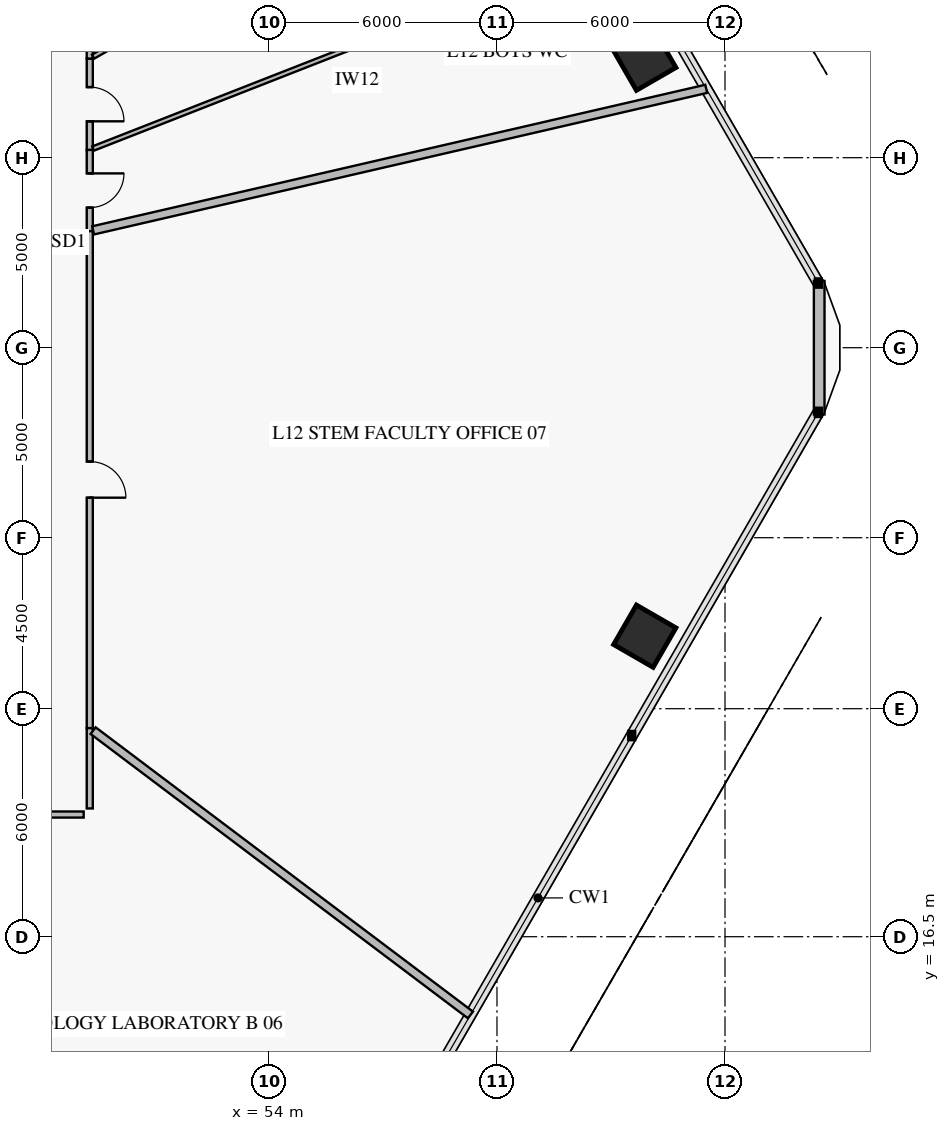
"""IFC4 building model, lengths in metres.
Left out: names, types, materials, properties, quantities, classifications, styles, units other than length and angle.
Written with IfcOpenShell. Run it as: python <this file> out.ifc"""

import sys

from ifc_helpers import new_model, si_unit, direction, frame, frame_2d, origin, origin_2d, place, context, subcontext, project, spatial, rectangle, extrude, element, fill, save


model = new_model("IFC4")
c1 = context("Model", 3, precision=1e-05, world=origin(), true_north=direction((0.0, 1.0)))
c2 = subcontext(c1, "Body", "Model", "MODEL_VIEW")
j1 = project(units=[si_unit("LENGTHUNIT", "METRE"), si_unit("PLANEANGLEUNIT", "RADIAN")], contexts=[c1])
p1 = place(None, origin())
s1 = spatial("IfcSite", under=j1, at=p1, CompositionType="ELEMENT")
p2 = place(p1, origin())
s2 = spatial("IfcBuilding", under=s1, at=p2, CompositionType="ELEMENT")
p3 = place(p2, frame((0.0, 0.0, 49.8)))
s3 = spatial("IfcBuildingStorey", under=s2, at=p3, CompositionType="ELEMENT", Elevation=49.8)
for number, where, z_axis, x_axis in (
    (1, (63.889, 39.592, 0.0), (0.0, 0.0, 1.0), (-0.5, 0.866, 0.0)),
    (2, (63.889, 24.408, 0.0), (0.0, 0.0, 1.0), (0.5, 0.866, 0.0)),
):
    element("IfcColumn", number, at=place(p3, frame(where, z_axis=z_axis, x_axis=x_axis)), inside=s3, PredefinedType="COLUMN", context=c2, shape_type="SweptSolid", body=[
        extrude(rectangle(XDim=1.2, YDim=1.2, at=origin_2d()), origin(), (0.0, 0.0, 1.0), 3.92),
    ])
p4 = place(p3, frame((68.479, 33.758, 0.0), z_axis=(0.0, 0.0, 1.0), x_axis=(0.0, -1.0, 0.0)))
e3 = element("IfcWall", 3, at=p4, inside=s3, PredefinedType="SOLIDWALL", context=c2, shape_type="SweptSolid", body=[
    extrude(rectangle(XDim=3.515, YDim=0.28, at=frame_2d((1.758, 0.0))), origin(), (0.0, 0.0, 1.0), 3.92),
])
p5 = place(p3, frame((49.285, 35.067, 0.0), z_axis=(0.0, 0.0, 1.0), x_axis=(0.0, 1.0, 0.0)))
e4 = element("IfcWall", 4, at=p5, inside=s3, PredefinedType="PARTITIONING", context=c2, shape_type="SweptSolid", body=[
    extrude(rectangle(XDim=2.139, YDim=0.16, at=frame_2d((1.07, 0.0))), origin(), (0.0, 0.0, 1.0), 3.22),
])
p6 = place(p5, frame((0.62, 0.0, 0.0)))
e5 = element("IfcOpeningElement", 5, at=p6, cuts=e4, PredefinedType="OPENING", context=c2, shape_type="SweptSolid", body=[
    extrude(rectangle(XDim=0.9, YDim=2.1, at=frame_2d((0.45, 1.05))), frame((0.0, 0.092, 0.0), z_axis=(0.0, -1.0, 0.0), x_axis=(1.0, 0.0, 0.0)), (0.0, 0.0, 1.0), 0.184),
])
p7 = place(p3, frame((49.285, 37.206, 0.0), z_axis=(0.0, 0.0, 1.0), x_axis=(0.0, 1.0, 0.0)))
e6 = element("IfcWall", 6, at=p7, inside=s3, PredefinedType="PARTITIONING", context=c2, shape_type="SweptSolid", body=[
    extrude(rectangle(XDim=2.402, YDim=0.16, at=frame_2d((1.201, 0.0))), origin(), (0.0, 0.0, 1.0), 3.92),
])
p8 = place(p7, frame((0.751, 0.0, 0.0)))
e7 = element("IfcOpeningElement", 7, at=p8, cuts=e6, PredefinedType="OPENING", context=c2, shape_type="SweptSolid", body=[
    extrude(rectangle(XDim=0.9, YDim=2.1, at=frame_2d((0.45, 1.05))), frame((0.0, 0.092, 0.0), z_axis=(0.0, -1.0, 0.0), x_axis=(1.0, 0.0, 0.0)), (0.0, 0.0, 1.0), 0.184),
])
p9 = place(p3, frame((49.285, 39.608, 0.0), z_axis=(0.0, 0.0, 1.0), x_axis=(0.0, 1.0, 0.0)))
e8 = element("IfcWall", 8, at=p9, inside=s3, PredefinedType="PARTITIONING", context=c2, shape_type="SweptSolid", body=[
    extrude(rectangle(XDim=2.403, YDim=0.16, at=frame_2d((1.201, 0.0))), origin(), (0.0, 0.0, 1.0), 3.92),
])
p10 = place(p9, frame((0.751, 0.0, 0.0)))
e9 = element("IfcOpeningElement", 9, at=p10, cuts=e8, PredefinedType="OPENING", context=c2, shape_type="SweptSolid", body=[
    extrude(rectangle(XDim=0.9, YDim=2.1, at=frame_2d((0.45, 1.05))), frame((0.0, 0.092, 0.0), z_axis=(0.0, -1.0, 0.0), x_axis=(1.0, 0.0, 0.0)), (0.0, 0.0, 1.0), 0.184),
])
p11 = place(p3, frame((41.729, 19.715, 0.0), z_axis=(0.0, 0.0, 1.0), x_axis=(1.0, 0.0, 0.0)))
e10 = element("IfcWall", 10, at=p11, inside=s3, PredefinedType="PARTITIONING", context=c2, shape_type="SweptSolid", body=[
    extrude(rectangle(XDim=7.396, YDim=0.16, at=frame_2d((3.698, 0.0))), origin(), (0.0, 0.0, 1.0), 3.22),
])
p12 = place(p11, frame((3.123, 0.0, 0.0)))
e11 = element("IfcOpeningElement", 11, at=p12, cuts=e10, PredefinedType="OPENING", context=c2, shape_type="SweptSolid", body=[
    extrude(rectangle(XDim=1.15, YDim=2.2, at=frame_2d((0.575, 1.1))), frame((0.0, 0.092, 0.0), z_axis=(0.0, -1.0, 0.0), x_axis=(1.0, 0.0, 0.0)), (0.0, 0.0, 1.0), 0.184),
])
p13 = place(p3, frame((49.285, 21.989, 0.0), z_axis=(0.0, 0.0, 1.0), x_axis=(0.0, 1.0, 0.0)))
e12 = element("IfcWall", 12, at=p13, inside=s3, PredefinedType="PARTITIONING", context=c2, shape_type="SweptSolid", body=[
    extrude(rectangle(XDim=13.078, YDim=0.16, at=frame_2d((6.539, 0.0))), origin(), (0.0, 0.0, 1.0), 3.22),
])
p14 = place(p13, frame((6.064, 0.0, 0.0)))
e13 = element("IfcOpeningElement", 13, at=p14, cuts=e12, PredefinedType="OPENING", context=c2, shape_type="SweptSolid", body=[
    extrude(rectangle(XDim=0.95, YDim=2.1, at=frame_2d((0.475, 1.05))), frame((0.0, 0.092, 0.0), z_axis=(0.0, -1.0, 0.0), x_axis=(1.0, 0.0, 0.0)), (0.0, 0.0, 1.0), 0.184),
])
p15 = place(p3, frame((49.373, 35.087, 0.0), z_axis=(0.0, 0.0, 1.0), x_axis=(0.974368575461, 0.224957505217, 0.0)))
e14 = element("IfcWall", 14, at=p15, inside=s3, PredefinedType="PARTITIONING", context=c2, shape_type="SweptSolid", body=[
    extrude(rectangle(XDim=16.557, YDim=0.22, at=frame_2d((8.278, 0.0))), origin(), (0.0, 0.0, 1.0), 3.17),
])
p16 = place(p3, frame((49.373, 37.241, 0.0), z_axis=(0.0, 0.0, 1.0), x_axis=(0.931056574404, 0.364874848761, 0.0)))
e15 = element("IfcWall", 15, at=p16, inside=s3, PredefinedType="PARTITIONING", context=c2, shape_type="SweptSolid", body=[
    extrude(rectangle(XDim=14.925, YDim=0.12, at=frame_2d((7.462, 0.0))), origin(), (0.0, 0.0, 1.0), 3.17),
])
p17 = place(p3, frame((49.373, 39.659, 0.0), z_axis=(0.0, 0.0, 1.0), x_axis=(0.867753476972, 0.496994872412, 0.0)))
e16 = element("IfcWall", 16, at=p17, inside=s3, PredefinedType="PARTITIONING", context=c2, shape_type="SweptSolid", body=[
    extrude(rectangle(XDim=4.545, YDim=0.12, at=frame_2d((2.272, 0.0))), origin(), (0.0, 0.0, 1.0), 3.92),
])
p18 = place(p3, frame((41.77, 19.627, 0.0), z_axis=(0.0, 0.0, 1.0), x_axis=(0.422616678834, -0.906308525156, 0.0)))
e17 = element("IfcWall", 17, at=p18, inside=s3, PredefinedType="PARTITIONING", context=c2, shape_type="SweptSolid", body=[
    extrude(rectangle(XDim=18.3, YDim=0.22, at=frame_2d((9.15, 0.0))), origin(), (0.0, 0.0, 1.0), 3.17),
])
p19 = place(p3, frame((49.285, 19.875, 0.0), z_axis=(0.0, 0.0, 1.0), x_axis=(0.0, 1.0, 0.0)))
e18 = element("IfcWall", 18, at=p19, inside=s3, PredefinedType="PARTITIONING", context=c2, shape_type="SweptSolid", body=[
    extrude(rectangle(XDim=2.114, YDim=0.16, at=frame_2d((1.057, 0.0))), origin(), (0.0, 0.0, 1.0), 3.92),
])
p20 = place(p3, frame((49.373, 21.923, 0.0), z_axis=(0.0, 0.0, 1.0), x_axis=(0.798630996951, -0.601821012187, 0.0)))
e19 = element("IfcWall", 19, at=p20, inside=s3, PredefinedType="PARTITIONING", context=c2, shape_type="SweptSolid", body=[
    extrude(rectangle(XDim=12.431, YDim=0.22, at=frame_2d((6.215, 0.0))), origin(), (0.0, 0.0, 1.0), 3.17),
])
p21 = place(p6, frame((0.9, 0.0, 0.0), z_axis=(0.0, 0.0, 1.0), x_axis=(-1.0, 0.0, 0.0)))
e20 = element("IfcDoor", 20, at=p21, inside=s3, OperationType="SINGLE_SWING_LEFT", PredefinedType="DOOR", context=c2, shape_type="SweptSolid", body=[
    extrude(rectangle(XDim=0.9, YDim=2.1, at=frame_2d((0.45, 1.05))), frame((0.0, 0.025, 0.0), z_axis=(0.0, -1.0, 0.0), x_axis=(1.0, 0.0, 0.0)), (0.0, 0.0, 1.0), 0.05),
])
fill(e5, e20)
p22 = place(p8, frame((0.9, 0.0, 0.0), z_axis=(0.0, 0.0, 1.0), x_axis=(-1.0, 0.0, 0.0)))
e21 = element("IfcDoor", 21, at=p22, inside=s3, OperationType="SINGLE_SWING_RIGHT", PredefinedType="DOOR", context=c2, shape_type="SweptSolid", body=[
    extrude(rectangle(XDim=0.9, YDim=2.1, at=frame_2d((0.45, 1.05))), frame((0.0, 0.025, 0.0), z_axis=(0.0, -1.0, 0.0), x_axis=(1.0, 0.0, 0.0)), (0.0, 0.0, 1.0), 0.05),
])
fill(e7, e21)
p23 = place(p14, frame((0.95, 0.0, 0.0), z_axis=(0.0, 0.0, 1.0), x_axis=(-1.0, 0.0, 0.0)))
e22 = element("IfcDoor", 22, at=p23, inside=s3, OperationType="SINGLE_SWING_RIGHT", PredefinedType="DOOR", context=c2, shape_type="SweptSolid", body=[
    extrude(rectangle(XDim=0.95, YDim=2.1, at=frame_2d((0.475, 1.05))), frame((0.0, 0.025, 0.0), z_axis=(0.0, -1.0, 0.0), x_axis=(1.0, 0.0, 0.0)), (0.0, 0.0, 1.0), 0.05),
])
fill(e13, e22)
save(model, sys.argv[1])
